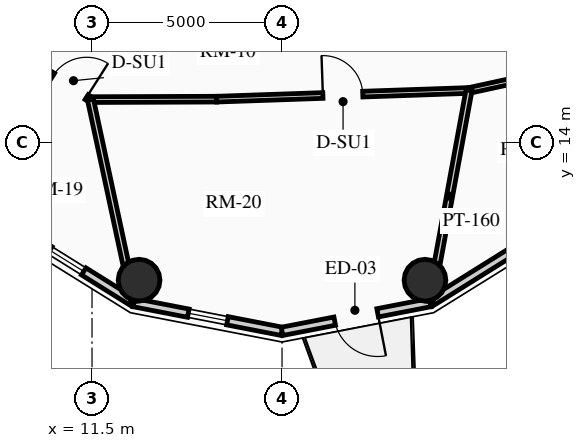
"""IFC4 building model, lengths in metres.
Left out: names, types, materials, properties, quantities, classifications, styles, units other than length and angle.
Written with IfcOpenShell. Run it as: python <this file> out.ifc"""

import sys

from ifc_helpers import new_model, si_unit, direction, frame, frame_2d, origin, origin_2d, place, context, subcontext, project, spatial, rectangle, circle, extrude, source, transform, mapped, element, fill, save


model = new_model("IFC4")
c1 = context("Model", 3, precision=1e-05, world=origin(), true_north=direction((0.0, 1.0)))
c2 = subcontext(c1, "Body", "Model", "MODEL_VIEW")
j1 = project(units=[si_unit("LENGTHUNIT", "METRE"), si_unit("PLANEANGLEUNIT", "RADIAN")], contexts=[c1])
p1 = place(None, origin())
s1 = spatial("IfcSite", under=j1, at=p1, CompositionType="ELEMENT")
p2 = place(p1, origin())
s2 = spatial("IfcBuilding", under=s1, at=p2, CompositionType="ELEMENT")
p3 = place(p2, frame((0.0, 0.0, 205.39)))
s3 = spatial("IfcBuildingStorey", under=s2, at=p3, CompositionType="ELEMENT", Elevation=205.39)
for number, where, z_axis, x_axis in (
    (1, (12.739, 10.377, 0.0), (0.0, 0.0, 1.0), (1.0, 0.0, 0.0)),
    (2, (20.261, 10.377, 0.0), (0.0, 0.0, 1.0), (1.0, 0.0, 0.0)),
):
    element("IfcColumn", number, at=place(p3, frame(where, z_axis=z_axis, x_axis=x_axis)), inside=s3, PredefinedType="USERDEFINED", context=c2, shape_type="SweptSolid", body=[
        extrude(circle(Radius=0.55, at=origin_2d()), origin(), (0.0, 0.0, 1.0), 2.91),
    ])
p4 = place(p3, frame((12.597, 9.787, 0.0), z_axis=(0.0, 0.0, 1.0), x_axis=(-0.848318713376, 0.529485939886, 0.0)))
e3 = element("IfcWall", 3, at=p4, inside=s3, PredefinedType="SOLIDWALL", context=c2, shape_type="SweptSolid", body=[
    extrude(rectangle(XDim=4.15, YDim=0.22, at=frame_2d((2.075, 0.0))), origin(), (0.0, 0.0, 1.0), 2.322),
])
m1 = source(origin(), c2, "Body", "SweptSolid", [
    extrude(rectangle(XDim=1.05, YDim=1.3, at=frame_2d((0.525, 0.65))), frame((0.0, 0.12, 0.0), z_axis=(0.0, -1.0, 0.0), x_axis=(1.0, 0.0, 0.0)), (0.0, 0.0, 1.0), 0.24),
])
p5 = place(p4, frame((1.55, 0.0, 0.65)))
e4 = element("IfcOpeningElement", 4, at=p5, cuts=e3, PredefinedType="OPENING", context=c2, shape_type="MappedRepresentation", body=[
    mapped(m1, transform((0.0, 0.0, 0.0), x_axis=(1.0, 0.0, 0.0), y_axis=(0.0, 1.0, 0.0), z_axis=(0.0, 0.0, 1.0), scale=1.0)),
])
p6 = place(p3, frame((16.5, 9.03, 0.0), z_axis=(0.0, 0.0, 1.0), x_axis=(-0.981700307484, 0.190432419211, 0.0)))
e5 = element("IfcWall", 5, at=p6, inside=s3, PredefinedType="SOLIDWALL", context=c2, shape_type="SweptSolid", body=[
    extrude(rectangle(XDim=3.976, YDim=0.22, at=frame_2d((1.988, 0.0))), origin(), (0.0, 0.0, 1.0), 2.322),
])
p7 = place(p6, frame((1.463, 0.0, 0.65)))
e6 = element("IfcOpeningElement", 6, at=p7, cuts=e5, PredefinedType="OPENING", context=c2, shape_type="MappedRepresentation", body=[
    mapped(m1, transform((0.0, 0.0, 0.0), x_axis=(1.0, 0.0, 0.0), y_axis=(0.0, 1.0, 0.0), z_axis=(0.0, 0.0, 1.0), scale=1.0)),
])
p8 = place(p3, frame((20.403, 9.787, 0.0), z_axis=(0.0, 0.0, 1.0), x_axis=(-0.981700307484, -0.190432419211, 0.0)))
e7 = element("IfcWall", 7, at=p8, inside=s3, PredefinedType="SOLIDWALL", context=c2, shape_type="SweptSolid", body=[
    extrude(rectangle(XDim=3.976, YDim=0.22, at=frame_2d((1.988, 0.0))), origin(), (0.0, 0.0, 1.0), 2.322),
])
m2 = source(origin(), c2, "Body", "SweptSolid", [
    extrude(rectangle(XDim=1.15, YDim=2.005, at=frame_2d((0.575, 1.002))), frame((0.0, 0.12, 0.0), z_axis=(0.0, -1.0, 0.0), x_axis=(1.0, 0.0, 0.0)), (0.0, 0.0, 1.0), 0.24),
])
p9 = place(p8, frame((1.413, 0.0, 0.0)))
e8 = element("IfcOpeningElement", 8, at=p9, cuts=e7, PredefinedType="OPENING", context=c2, shape_type="MappedRepresentation", body=[
    mapped(m2, transform((0.0, 0.0, 0.0), x_axis=(1.0, 0.0, 0.0), y_axis=(0.0, 1.0, 0.0), z_axis=(0.0, 0.0, 1.0), scale=1.0)),
])
p10 = place(p3, frame((23.924, 11.985, 0.0), z_axis=(0.0, 0.0, 1.0), x_axis=(-0.848318713376, -0.529485939886, 0.0)))
e9 = element("IfcWall", 9, at=p10, inside=s3, PredefinedType="SOLIDWALL", context=c2, shape_type="SweptSolid", body=[
    extrude(rectangle(XDim=4.15, YDim=0.22, at=frame_2d((2.075, 0.0))), origin(), (0.0, 0.0, 1.0), 2.322),
])
p11 = place(p3, frame((10.115, 15.983, 0.0), z_axis=(0.0, 0.0, 1.0), x_axis=(0.843995849351, -0.536349705209, 0.0)))
e10 = element("IfcWall", 10, at=p11, inside=s3, PredefinedType="PARTITIONING", context=c2, shape_type="SweptSolid", body=[
    extrude(rectangle(XDim=1.593, YDim=0.15, at=frame_2d((0.796, 0.0))), origin(), (0.0, 0.0, 1.0), 2.255),
])
m3 = source(origin(), c2, "Body", "SweptSolid", [
    extrude(rectangle(XDim=1.05, YDim=2.015, at=frame_2d((0.525, 1.007))), frame((0.0, 0.085, 0.0), z_axis=(0.0, -1.0, 0.0), x_axis=(1.0, 0.0, 0.0)), (0.0, 0.0, 1.0), 0.17),
])
p12 = place(p11, frame((0.423, 0.0, 0.0)))
e11 = element("IfcOpeningElement", 11, at=p12, cuts=e10, PredefinedType="OPENING", context=c2, shape_type="MappedRepresentation", body=[
    mapped(m3, transform((0.0, 0.0, 0.0), x_axis=(1.0, 0.0, 0.0), y_axis=(0.0, 1.0, 0.0), z_axis=(0.0, 0.0, 1.0), scale=1.0)),
])
p13 = place(p3, frame((11.46, 15.129, 0.0), z_axis=(0.0, 0.0, 1.0), x_axis=(0.999993513287, 0.003601858435, 0.0)))
e12 = element("IfcWall", 12, at=p13, inside=s3, PredefinedType="PARTITIONING", context=c2, shape_type="SweptSolid", body=[
    extrude(rectangle(XDim=3.321, YDim=0.15, at=frame_2d((1.661, 0.0))), origin(), (0.0, 0.0, 1.0), 2.322),
])
p14 = place(p3, frame((14.781, 15.141, 0.0), z_axis=(0.0, 0.0, 1.0), x_axis=(0.999407918707, 0.034406569513, 0.0)))
e13 = element("IfcWall", 13, at=p14, inside=s3, PredefinedType="PARTITIONING", context=c2, shape_type="SweptSolid", body=[
    extrude(rectangle(XDim=6.642, YDim=0.15, at=frame_2d((3.321, 0.0))), origin(), (0.0, 0.0, 1.0), 2.255),
])
p15 = place(p14, frame((2.796, 0.0, 0.0)))
e14 = element("IfcOpeningElement", 14, at=p15, cuts=e13, PredefinedType="OPENING", context=c2, shape_type="MappedRepresentation", body=[
    mapped(m3, transform((0.0, 0.0, 0.0), x_axis=(1.0, 0.0, 0.0), y_axis=(0.0, 1.0, 0.0), z_axis=(0.0, 0.0, 1.0), scale=1.0)),
])
p16 = place(p3, frame((21.419, 15.369, 0.0), z_axis=(0.0, 0.0, 1.0), x_axis=(0.977192701953, 0.212354475464, 0.0)))
e15 = element("IfcWall", 15, at=p16, inside=s3, PredefinedType="PARTITIONING", context=c2, shape_type="SweptSolid", body=[
    extrude(rectangle(XDim=1.888, YDim=0.15, at=frame_2d((0.944, 0.0))), origin(), (0.0, 0.0, 1.0), 2.255),
])
p17 = place(p3, frame((11.46, 15.129, 0.0), z_axis=(0.0, 0.0, 1.0), x_axis=(0.210058897642, -0.977688733453, 0.0)))
e16 = element("IfcWall", 16, at=p17, inside=s3, PredefinedType="PARTITIONING", context=c2, shape_type="SweptSolid", body=[
    extrude(rectangle(XDim=5.444, YDim=0.16, at=frame_2d((2.722, 0.0))), origin(), (0.0, 0.0, 1.0), 2.322),
])
p18 = place(p3, frame((21.419, 15.369, 0.0), z_axis=(0.0, 0.0, 1.0), x_axis=(-0.180685606423, -0.98354090491, 0.0)))
e17 = element("IfcWall", 17, at=p18, inside=s3, PredefinedType="PARTITIONING", context=c2, shape_type="SweptSolid", body=[
    extrude(rectangle(XDim=5.656, YDim=0.16, at=frame_2d((2.828, 0.0))), origin(), (0.0, 0.0, 1.0), 2.322),
])
m4 = source(origin(), c2, "Body", "SweptSolid", [
    extrude(rectangle(XDim=1.05, YDim=1.3, at=frame_2d((0.525, 0.65))), frame((0.0, 0.03, 0.0), z_axis=(0.0, -1.0, 0.0), x_axis=(1.0, 0.0, 0.0)), (0.0, 0.0, 1.0), 0.06),
])
p19 = place(p5, origin())
e18 = element("IfcWindow", 18, at=p19, inside=s3, PartitioningType="SINGLE_PANEL", PredefinedType="WINDOW", context=c2, shape_type="MappedRepresentation", body=[
    mapped(m4, transform((0.0, 0.0, 0.0), x_axis=(1.0, 0.0, 0.0), y_axis=(0.0, 1.0, 0.0), z_axis=(0.0, 0.0, 1.0), scale=1.0)),
])
fill(e4, e18)
p20 = place(p7, origin())
e19 = element("IfcWindow", 19, at=p20, inside=s3, PartitioningType="SINGLE_PANEL", PredefinedType="WINDOW", context=c2, shape_type="MappedRepresentation", body=[
    mapped(m4, transform((0.0, 0.0, 0.0), x_axis=(1.0, 0.0, 0.0), y_axis=(0.0, 1.0, 0.0), z_axis=(0.0, 0.0, 1.0), scale=1.0)),
])
fill(e6, e19)
m5 = source(origin(), c2, "Body", "SweptSolid", [
    extrude(rectangle(XDim=1.15, YDim=2.005, at=frame_2d((0.575, 1.002))), frame((0.0, 0.025, 0.0), z_axis=(0.0, -1.0, 0.0), x_axis=(1.0, 0.0, 0.0)), (0.0, 0.0, 1.0), 0.05),
])
p21 = place(p9, origin())
e20 = element("IfcDoor", 20, at=p21, inside=s3, OperationType="SINGLE_SWING_LEFT", PredefinedType="DOOR", context=c2, shape_type="MappedRepresentation", body=[
    mapped(m5, transform((0.0, 0.0, 0.0), x_axis=(1.0, 0.0, 0.0), y_axis=(0.0, 1.0, 0.0), z_axis=(0.0, 0.0, 1.0), scale=1.0)),
])
fill(e8, e20)
m6 = source(origin(), c2, "Body", "SweptSolid", [
    extrude(rectangle(XDim=1.05, YDim=2.015, at=frame_2d((0.525, 1.007))), frame((0.0, 0.025, 0.0), z_axis=(0.0, -1.0, 0.0), x_axis=(1.0, 0.0, 0.0)), (0.0, 0.0, 1.0), 0.05),
])
p22 = place(p12, origin())
e21 = element("IfcDoor", 21, at=p22, inside=s3, OperationType="SINGLE_SWING_RIGHT", PredefinedType="DOOR", context=c2, shape_type="MappedRepresentation", body=[
    mapped(m6, transform((0.0, 0.0, 0.0), x_axis=(1.0, 0.0, 0.0), y_axis=(0.0, 1.0, 0.0), z_axis=(0.0, 0.0, 1.0), scale=1.0)),
])
fill(e11, e21)
p23 = place(p15, origin())
e22 = element("IfcDoor", 22, at=p23, inside=s3, OperationType="SINGLE_SWING_LEFT", PredefinedType="DOOR", context=c2, shape_type="MappedRepresentation", body=[
    mapped(m6, transform((0.0, 0.0, 0.0), x_axis=(1.0, 0.0, 0.0), y_axis=(0.0, 1.0, 0.0), z_axis=(0.0, 0.0, 1.0), scale=1.0)),
])
fill(e14, e22)
save(model, sys.argv[1])
